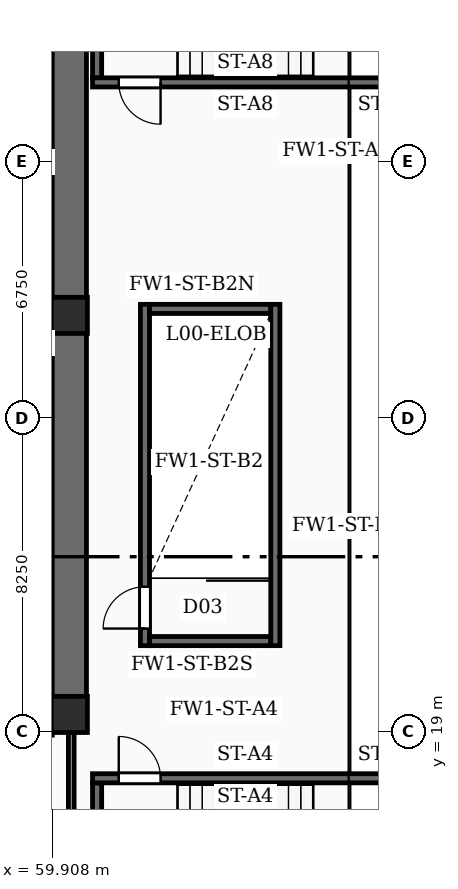
"""IFC4 building model, lengths in metres.
Left out: names, types, materials, properties, quantities, classifications, styles, units other than length and angle.
Written with IfcOpenShell. Run it as: python <this file> out.ifc"""

import sys

from ifc_helpers import new_model, si_unit, direction, frame, frame_2d, origin, origin_2d, place, context, subcontext, project, spatial, rectangle, extrude, element, fill, save


model = new_model("IFC4")
c1 = context("Model", 3, precision=1e-05, world=origin(), true_north=direction((0.0, 1.0)))
c2 = subcontext(c1, "Body", "Model", "MODEL_VIEW")
j1 = project(units=[si_unit("LENGTHUNIT", "METRE"), si_unit("PLANEANGLEUNIT", "RADIAN")], contexts=[c1])
p1 = place(None, origin())
s1 = spatial("IfcSite", under=j1, at=p1, CompositionType="ELEMENT")
p2 = place(p1, origin())
s2 = spatial("IfcBuilding", under=s1, at=p2, CompositionType="ELEMENT")
p3 = place(p2, origin())
s3 = spatial("IfcBuildingStorey", under=s2, at=p3, CompositionType="ELEMENT", Elevation=0.0)
p4 = place(p3, frame((60.35, 19.0, -0.45), z_axis=(0.0, 0.0, 1.0), x_axis=(0.0, 1.0, 0.0)))
e1 = element("IfcWall", 1, at=p4, inside=s3, PredefinedType="SHEAR", context=c2, shape_type="SweptSolid", body=[
    extrude(rectangle(XDim=20.8, YDim=0.9, at=frame_2d((10.4, 0.0))), origin(), (0.0, 0.0, 1.0), 8.1),
])
for number, where, z_axis, x_axis in (
    (2, (60.35, 19.45, -0.45), (0.0, 0.0, 1.0), (1.0, 0.0, 0.0)),
    (3, (60.35, 29.95, -0.45), (0.0, 0.0, 1.0), (1.0, 0.0, 0.0)),
):
    element("IfcColumn", number, at=place(p3, frame(where, z_axis=z_axis, x_axis=x_axis)), inside=s3, PredefinedType="COLUMN", context=c2, shape_type="SweptSolid", body=[
        extrude(rectangle(XDim=0.95, YDim=0.95, at=origin_2d()), origin(), (0.0, 0.0, 1.0), 8.1),
    ])
p5 = place(p3, frame((60.96, 17.77, 0.0), z_axis=(0.0, 0.0, 1.0), x_axis=(1.0, 0.0, 0.0)))
e4 = element("IfcWall", 4, at=p5, inside=s3, PredefinedType="SOLIDWALL", context=c2, shape_type="SweptSolid", body=[
    extrude(rectangle(XDim=9.88, YDim=0.24, at=frame_2d((4.94, 0.0))), origin(), (0.0, 0.0, 1.0), 7.65),
])
p6 = place(p5, frame((0.69, 0.0, 0.0)))
e5 = element("IfcOpeningElement", 5, at=p6, cuts=e4, PredefinedType="OPENING", context=c2, shape_type="SweptSolid", body=[
    extrude(rectangle(XDim=1.1, YDim=2.15, at=frame_2d((0.55, 1.075))), frame((0.0, 0.13, 0.0), z_axis=(0.0, -1.0, 0.0), x_axis=(1.0, 0.0, 0.0)), (0.0, 0.0, 1.0), 0.26),
])
p7 = place(p3, frame((61.08, 13.5, 0.0), z_axis=(0.0, 0.0, 1.0), x_axis=(0.0, 1.0, 0.0)))
e6 = element("IfcWall", 6, at=p7, inside=s3, PredefinedType="SOLIDWALL", context=c2, shape_type="SweptSolid", body=[
    extrude(rectangle(XDim=4.15, YDim=0.24, at=frame_2d((2.075, 0.0))), origin(), (0.0, 0.0, 1.0), 7.65),
])
p8 = place(p3, frame((70.84, 36.08, 0.0), z_axis=(0.0, 0.0, 1.0), x_axis=(-1.0, 0.0, 0.0)))
e7 = element("IfcWall", 7, at=p8, inside=s3, PredefinedType="SOLIDWALL", context=c2, shape_type="SweptSolid", body=[
    extrude(rectangle(XDim=9.88, YDim=0.24, at=frame_2d((4.94, 0.0))), origin(), (0.0, 0.0, 1.0), 7.65),
])
p9 = place(p8, frame((8.09, 0.0, 0.0)))
e8 = element("IfcOpeningElement", 8, at=p9, cuts=e7, PredefinedType="OPENING", context=c2, shape_type="SweptSolid", body=[
    extrude(rectangle(XDim=1.1, YDim=2.15, at=frame_2d((0.55, 1.075))), frame((0.0, 0.13, 0.0), z_axis=(0.0, -1.0, 0.0), x_axis=(1.0, 0.0, 0.0)), (0.0, 0.0, 1.0), 0.26),
])
p10 = place(p3, frame((61.08, 36.2, 0.0), z_axis=(0.0, 0.0, 1.0), x_axis=(0.0, 1.0, 0.0)))
e9 = element("IfcWall", 9, at=p10, inside=s3, PredefinedType="SOLIDWALL", context=c2, shape_type="SweptSolid", body=[
    extrude(rectangle(XDim=4.15, YDim=0.24, at=frame_2d((2.075, 0.0))), origin(), (0.0, 0.0, 1.0), 7.65),
])
p11 = place(p3, frame((62.34, 21.26, 0.0), z_axis=(0.0, 0.0, 1.0), x_axis=(0.0, 1.0, 0.0)))
e10 = element("IfcWall", 10, at=p11, inside=s3, PredefinedType="SOLIDWALL", context=c2, shape_type="SweptSolid", body=[
    extrude(rectangle(XDim=8.98, YDim=0.24, at=frame_2d((4.49, 0.0))), origin(), (0.0, 0.0, 1.0), 7.65),
])
p12 = place(p11, frame((0.45, 0.0, 0.0)))
e11 = element("IfcOpeningElement", 11, at=p12, cuts=e10, PredefinedType="OPENING", context=c2, shape_type="SweptSolid", body=[
    extrude(rectangle(XDim=1.1, YDim=2.15, at=frame_2d((0.55, 1.075))), frame((0.0, 0.13, 0.0), z_axis=(0.0, -1.0, 0.0), x_axis=(1.0, 0.0, 0.0)), (0.0, 0.0, 1.0), 0.26),
])
p13 = place(p3, frame((65.77, 21.26, 0.0), z_axis=(0.0, 0.0, 1.0), x_axis=(0.0, 1.0, 0.0)))
e12 = element("IfcWall", 12, at=p13, inside=s3, PredefinedType="SOLIDWALL", context=c2, shape_type="SweptSolid", body=[
    extrude(rectangle(XDim=8.98, YDim=0.24, at=frame_2d((4.49, 0.0))), origin(), (0.0, 0.0, 1.0), 7.65),
])
for number, where, z_axis, x_axis in (
    (13, (62.46, 21.38, 0.0), (0.0, 0.0, 1.0), (1.0, 0.0, 0.0)),
    (14, (62.46, 30.12, 0.0), (0.0, 0.0, 1.0), (1.0, 0.0, 0.0)),
):
    element("IfcWall", number, at=place(p3, frame(where, z_axis=z_axis, x_axis=x_axis)), inside=s3, PredefinedType="SOLIDWALL", context=c2, shape_type="SweptSolid", body=[
        extrude(rectangle(XDim=3.19, YDim=0.24, at=frame_2d((1.595, 0.0))), origin(), (0.0, 0.0, 1.0), 7.65),
    ])
p14 = place(p3, frame((60.4, 15.4, 0.0), z_axis=(0.0, 0.0, 1.0), x_axis=(0.0, 1.0, 0.0)))
e15 = element("IfcWall", 15, at=p14, inside=s3, PredefinedType="PARTITIONING", context=c2, shape_type="SweptSolid", body=[
    extrude(rectangle(XDim=3.58, YDim=0.15, at=frame_2d((1.79, 0.0))), origin(), (0.0, 0.0, 1.0), 6.71),
])
p15 = place(p6, origin())
e16 = element("IfcDoor", 16, at=p15, inside=s3, OperationType="SINGLE_SWING_LEFT", PredefinedType="DOOR", context=c2, shape_type="SweptSolid", body=[
    extrude(rectangle(XDim=1.1, YDim=2.15, at=frame_2d((0.55, 1.075))), frame((0.0, 0.025, 0.0), z_axis=(0.0, -1.0, 0.0), x_axis=(1.0, 0.0, 0.0)), (0.0, 0.0, 1.0), 0.05),
])
fill(e5, e16)
p16 = place(p9, origin())
e17 = element("IfcDoor", 17, at=p16, inside=s3, OperationType="SINGLE_SWING_LEFT", PredefinedType="DOOR", context=c2, shape_type="SweptSolid", body=[
    extrude(rectangle(XDim=1.1, YDim=2.15, at=frame_2d((0.55, 1.075))), frame((0.0, 0.025, 0.0), z_axis=(0.0, -1.0, 0.0), x_axis=(1.0, 0.0, 0.0)), (0.0, 0.0, 1.0), 0.05),
])
fill(e8, e17)
p17 = place(p12, origin())
e18 = element("IfcDoor", 18, at=p17, inside=s3, OperationType="SINGLE_SWING_LEFT", PredefinedType="DOOR", context=c2, shape_type="SweptSolid", body=[
    extrude(rectangle(XDim=1.1, YDim=2.15, at=frame_2d((0.55, 1.075))), frame((0.0, 0.025, 0.0), z_axis=(0.0, -1.0, 0.0), x_axis=(1.0, 0.0, 0.0)), (0.0, 0.0, 1.0), 0.05),
])
fill(e11, e18)
save(model, sys.argv[1])
